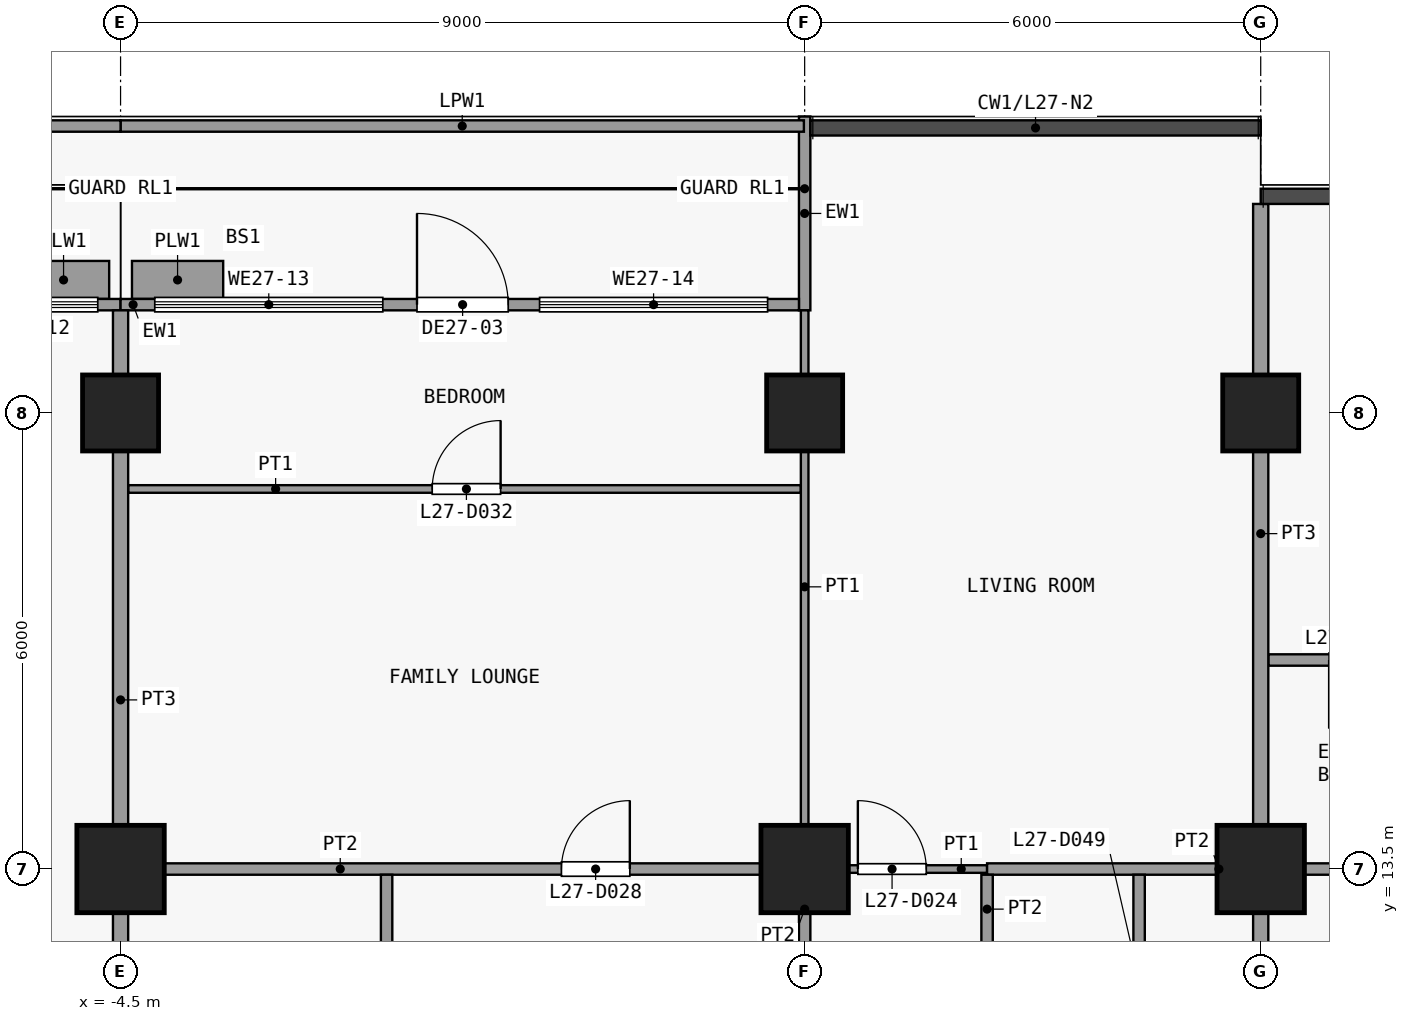
"""IFC4 building model, lengths in metres.
Left out: names, types, materials, properties, quantities, classifications, styles, units other than length and angle.
Written with IfcOpenShell. Run it as: python <this file> out.ifc"""

import sys

from ifc_helpers import new_model, si_unit, direction, frame, frame_2d, origin, origin_2d, place, context, subcontext, project, spatial, rectangle, extrude, element, fill, save


model = new_model("IFC4")
c1 = context("Model", 3, precision=1e-05, world=origin(), true_north=direction((0.0, 1.0)))
c2 = subcontext(c1, "Body", "Model", "MODEL_VIEW")
j1 = project(units=[si_unit("LENGTHUNIT", "METRE"), si_unit("PLANEANGLEUNIT", "RADIAN")], contexts=[c1])
p1 = place(None, origin())
s1 = spatial("IfcSite", under=j1, at=p1, CompositionType="ELEMENT")
p2 = place(p1, origin())
s2 = spatial("IfcBuilding", under=s1, at=p2, CompositionType="ELEMENT")
p3 = place(p2, frame((0.0, 0.0, 109.9)))
s3 = spatial("IfcBuildingStorey", under=s2, at=p3, CompositionType="ELEMENT", Elevation=109.9)
p4 = place(p3, frame((-4.5, 13.5, 0.0), z_axis=(0.0, 0.0, 1.0), x_axis=(1.0, 0.0, 0.0)))
e1 = element("IfcColumn", 1, at=p4, inside=s3, PredefinedType="COLUMN", context=c2, shape_type="SweptSolid", body=[
    extrude(rectangle(XDim=1.15, YDim=1.15, at=origin_2d()), origin(), (0.0, 0.0, 1.0), 3.6),
])
p5 = place(p3, frame((-4.5, 19.5, 0.0), z_axis=(0.0, 0.0, 1.0), x_axis=(1.0, 0.0, 0.0)))
e2 = element("IfcColumn", 2, at=p5, inside=s3, PredefinedType="COLUMN", context=c2, shape_type="SweptSolid", body=[
    extrude(rectangle(XDim=1.0, YDim=1.0, at=origin_2d()), origin(), (0.0, 0.0, 1.0), 3.6),
])
p6 = place(p3, frame((4.5, 13.5, 0.0), z_axis=(0.0, 0.0, 1.0), x_axis=(1.0, 0.0, 0.0)))
e3 = element("IfcColumn", 3, at=p6, inside=s3, PredefinedType="COLUMN", context=c2, shape_type="SweptSolid", body=[
    extrude(rectangle(XDim=1.15, YDim=1.15, at=origin_2d()), origin(), (0.0, 0.0, 1.0), 3.6),
])
p7 = place(p3, frame((4.5, 19.5, 0.0), z_axis=(0.0, 0.0, 1.0), x_axis=(1.0, 0.0, 0.0)))
e4 = element("IfcColumn", 4, at=p7, inside=s3, PredefinedType="COLUMN", context=c2, shape_type="SweptSolid", body=[
    extrude(rectangle(XDim=1.0, YDim=1.0, at=origin_2d()), origin(), (0.0, 0.0, 1.0), 3.6),
])
p8 = place(p3, frame((10.5, 13.5, 0.0), z_axis=(0.0, 0.0, 1.0), x_axis=(1.0, 0.0, 0.0)))
e5 = element("IfcColumn", 5, at=p8, inside=s3, PredefinedType="COLUMN", context=c2, shape_type="SweptSolid", body=[
    extrude(rectangle(XDim=1.15, YDim=1.15, at=origin_2d()), origin(), (0.0, 0.0, 1.0), 3.6),
])
p9 = place(p3, frame((10.5, 19.5, 0.0), z_axis=(0.0, 0.0, 1.0), x_axis=(1.0, 0.0, 0.0)))
e6 = element("IfcColumn", 6, at=p9, inside=s3, PredefinedType="COLUMN", context=c2, shape_type="SweptSolid", body=[
    extrude(rectangle(XDim=1.0, YDim=1.0, at=origin_2d()), origin(), (0.0, 0.0, 1.0), 3.6),
])
p10 = place(p3, frame((-10.5, 20.925, 0.0), z_axis=(0.0, 0.0, 1.0), x_axis=(1.0, 0.0, 0.0)))
e7 = element("IfcWall", 7, at=p10, inside=s3, PredefinedType="SOLIDWALL", context=c2, shape_type="SweptSolid", body=[
    extrude(rectangle(XDim=6.0, YDim=0.15, at=frame_2d((3.0, 0.0))), origin(), (0.0, 0.0, 1.0), 3.3),
])
p11 = place(p10, frame((2.4, 0.0, 0.0)))
e8 = element("IfcOpeningElement", 8, at=p11, cuts=e7, PredefinedType="OPENING", context=c2, shape_type="SweptSolid", body=[
    extrude(rectangle(XDim=1.2, YDim=2.4, at=frame_2d((0.6, 1.2))), frame((0.0, 0.085, 0.0), z_axis=(0.0, -1.0, 0.0), x_axis=(1.0, 0.0, 0.0)), (0.0, 0.0, 1.0), 0.17),
])
p12 = place(p10, frame((0.3, 0.0, 0.9)))
e9 = element("IfcOpeningElement", 9, at=p12, cuts=e7, PredefinedType="OPENING", context=c2, shape_type="SweptSolid", body=[
    extrude(rectangle(XDim=1.8, YDim=2.1, at=frame_2d((0.9, 1.05))), frame((0.0, 0.085, 0.0), z_axis=(0.0, -1.0, 0.0), x_axis=(1.0, 0.0, 0.0)), (0.0, 0.0, 1.0), 0.17),
])
p13 = place(p10, frame((3.9, 0.0, 0.9)))
e10 = element("IfcOpeningElement", 10, at=p13, cuts=e7, PredefinedType="OPENING", context=c2, shape_type="SweptSolid", body=[
    extrude(rectangle(XDim=1.8, YDim=2.1, at=frame_2d((0.9, 1.05))), frame((0.0, 0.085, 0.0), z_axis=(0.0, -1.0, 0.0), x_axis=(1.0, 0.0, 0.0)), (0.0, 0.0, 1.0), 0.17),
])
p14 = place(p3, frame((-5.85, 21.25, 0.0), z_axis=(0.0, 0.0, 1.0), x_axis=(1.0, 0.0, 0.0)))
e11 = element("IfcWall", 11, at=p14, inside=s3, PredefinedType="USERDEFINED", context=c2, shape_type="SweptSolid", body=[
    extrude(rectangle(XDim=1.2, YDim=0.5, at=frame_2d((0.6, 0.0))), origin(), (0.0, 0.0, 1.0), 0.9),
])
p15 = place(p3, frame((4.5, 20.85, 0.0), z_axis=(0.0, 0.0, 1.0), x_axis=(0.0, 1.0, 0.0)))
e12 = element("IfcWall", 12, at=p15, inside=s3, PredefinedType="SOLIDWALL", context=c2, shape_type="SweptSolid", body=[
    extrude(rectangle(XDim=2.55, YDim=0.15, at=frame_2d((1.275, 0.0))), origin(), (0.0, 0.0, 1.0), 3.3),
])
p16 = place(p3, frame((-4.5, 20.925, 0.0), z_axis=(0.0, 0.0, 1.0), x_axis=(1.0, 0.0, 0.0)))
e13 = element("IfcWall", 13, at=p16, inside=s3, PredefinedType="SOLIDWALL", context=c2, shape_type="SweptSolid", body=[
    extrude(rectangle(XDim=8.925, YDim=0.15, at=frame_2d((4.462, 0.0))), origin(), (0.0, 0.0, 1.0), 3.3),
])
p17 = place(p16, frame((3.9, 0.0, 0.0)))
e14 = element("IfcOpeningElement", 14, at=p17, cuts=e13, PredefinedType="OPENING", context=c2, shape_type="SweptSolid", body=[
    extrude(rectangle(XDim=1.2, YDim=2.4, at=frame_2d((0.6, 1.2))), frame((0.0, 0.085, 0.0), z_axis=(0.0, -1.0, 0.0), x_axis=(1.0, 0.0, 0.0)), (0.0, 0.0, 1.0), 0.17),
])
p18 = place(p16, frame((0.45, 0.0, 0.9)))
e15 = element("IfcOpeningElement", 15, at=p18, cuts=e13, PredefinedType="OPENING", context=c2, shape_type="SweptSolid", body=[
    extrude(rectangle(XDim=3.0, YDim=2.1, at=frame_2d((1.5, 1.05))), frame((0.0, 0.085, 0.0), z_axis=(0.0, -1.0, 0.0), x_axis=(1.0, 0.0, 0.0)), (0.0, 0.0, 1.0), 0.17),
])
p19 = place(p16, frame((5.512, 0.0, 0.9)))
e16 = element("IfcOpeningElement", 16, at=p19, cuts=e13, PredefinedType="OPENING", context=c2, shape_type="SweptSolid", body=[
    extrude(rectangle(XDim=3.0, YDim=2.1, at=frame_2d((1.5, 1.05))), frame((0.0, 0.085, 0.0), z_axis=(0.0, -1.0, 0.0), x_axis=(1.0, 0.0, 0.0)), (0.0, 0.0, 1.0), 0.17),
])
p20 = place(p3, frame((-4.35, 21.25, 0.0), z_axis=(0.0, 0.0, 1.0), x_axis=(1.0, 0.0, 0.0)))
e17 = element("IfcWall", 17, at=p20, inside=s3, PredefinedType="USERDEFINED", context=c2, shape_type="SweptSolid", body=[
    extrude(rectangle(XDim=1.2, YDim=0.5, at=frame_2d((0.6, 0.0))), origin(), (0.0, 0.0, 1.0), 0.9),
])
p21 = place(p3, frame((-4.5, 23.275, 0.0), z_axis=(0.0, 0.0, 1.0), x_axis=(1.0, 0.0, 0.0)))
e18 = element("IfcWall", 18, at=p21, inside=s3, PredefinedType="PARAPET", context=c2, shape_type="SweptSolid", body=[
    extrude(rectangle(XDim=8.99, YDim=0.15, at=frame_2d((4.495, 0.0))), origin(), (0.0, 0.0, 1.0), 1.15),
])
p22 = place(p3, frame((-10.3, 23.275, 0.0), z_axis=(0.0, 0.0, 1.0), x_axis=(1.0, 0.0, 0.0)))
e19 = element("IfcWall", 19, at=p22, inside=s3, PredefinedType="PARAPET", context=c2, shape_type="SweptSolid", body=[
    extrude(rectangle(XDim=5.8, YDim=0.15, at=frame_2d((2.9, 0.0))), origin(), (0.0, 0.0, 1.0), 1.15),
])
p23 = place(p3, frame((4.5, 13.5, 0.0), z_axis=(0.0, 0.0, 1.0), x_axis=(1.0, 0.0, 0.0)))
e20 = element("IfcWall", 20, at=p23, inside=s3, PredefinedType="PARTITIONING", context=c2, shape_type="SweptSolid", body=[
    extrude(rectangle(XDim=2.4, YDim=0.1, at=frame_2d((1.2, 0.0))), origin(), (0.0, 0.0, 1.0), 3.3),
])
p24 = place(p23, frame((0.7, 0.0, 0.0)))
e21 = element("IfcOpeningElement", 21, at=p24, cuts=e20, PredefinedType="OPENING", context=c2, shape_type="SweptSolid", body=[
    extrude(rectangle(XDim=0.9, YDim=2.1, at=frame_2d((0.45, 1.05))), frame((0.0, 0.06, 0.0), z_axis=(0.0, -1.0, 0.0), x_axis=(1.0, 0.0, 0.0)), (0.0, 0.0, 1.0), 0.12),
])
p25 = place(p3, frame((-4.4, 13.5, 0.0), z_axis=(0.0, 0.0, 1.0), x_axis=(1.0, 0.0, 0.0)))
e22 = element("IfcWall", 22, at=p25, inside=s3, PredefinedType="PARTITIONING", context=c2, shape_type="SweptSolid", body=[
    extrude(rectangle(XDim=8.9, YDim=0.15, at=frame_2d((4.45, 0.0))), origin(), (0.0, 0.0, 1.0), 3.3),
])
p26 = place(p25, frame((5.7, 0.0, 0.0)))
e23 = element("IfcOpeningElement", 23, at=p26, cuts=e22, PredefinedType="OPENING", context=c2, shape_type="SweptSolid", body=[
    extrude(rectangle(XDim=0.9, YDim=2.1, at=frame_2d((0.45, 1.05))), frame((0.0, 0.085, 0.0), z_axis=(0.0, -1.0, 0.0), x_axis=(1.0, 0.0, 0.0)), (0.0, 0.0, 1.0), 0.17),
])
p27 = place(p3, frame((6.9, 13.5, 0.0), z_axis=(0.0, 0.0, 1.0), x_axis=(1.0, 0.0, 0.0)))
e24 = element("IfcWall", 24, at=p27, inside=s3, PredefinedType="PARTITIONING", context=c2, shape_type="SweptSolid", body=[
    extrude(rectangle(XDim=6.1, YDim=0.15, at=frame_2d((3.05, 0.0))), origin(), (0.0, 0.0, 1.0), 3.3),
])
p28 = place(p3, frame((10.6, 16.25, 0.0), z_axis=(0.0, 0.0, 1.0), x_axis=(1.0, 0.0, 0.0)))
e25 = element("IfcWall", 25, at=p28, inside=s3, PredefinedType="PARTITIONING", context=c2, shape_type="SweptSolid", body=[
    extrude(rectangle(XDim=2.6, YDim=0.15, at=frame_2d((1.3, 0.0))), origin(), (0.0, 0.0, 1.0), 3.3),
])
p29 = place(p28, frame((0.8, 0.0, 0.0)))
e26 = element("IfcOpeningElement", 26, at=p29, cuts=e25, PredefinedType="OPENING", context=c2, shape_type="SweptSolid", body=[
    extrude(rectangle(XDim=0.9, YDim=2.1, at=frame_2d((0.45, 1.05))), frame((0.0, 0.085, 0.0), z_axis=(0.0, -1.0, 0.0), x_axis=(1.0, 0.0, 0.0)), (0.0, 0.0, 1.0), 0.17),
])
p30 = place(p3, frame((-4.4, 18.5, 0.0), z_axis=(0.0, 0.0, 1.0), x_axis=(1.0, 0.0, 0.0)))
e27 = element("IfcWall", 27, at=p30, inside=s3, PredefinedType="PARTITIONING", context=c2, shape_type="SweptSolid", body=[
    extrude(rectangle(XDim=8.85, YDim=0.1, at=frame_2d((4.425, 0.0))), origin(), (0.0, 0.0, 1.0), 3.3),
])
p31 = place(p30, frame((4.0, 0.0, 0.0)))
e28 = element("IfcOpeningElement", 28, at=p31, cuts=e27, PredefinedType="OPENING", context=c2, shape_type="SweptSolid", body=[
    extrude(rectangle(XDim=0.9, YDim=2.1, at=frame_2d((0.45, 1.05))), frame((0.0, 0.06, 0.0), z_axis=(0.0, -1.0, 0.0), x_axis=(1.0, 0.0, 0.0)), (0.0, 0.0, 1.0), 0.12),
])
p32 = place(p3, frame((-4.5, 10.6, 0.0), z_axis=(0.0, 0.0, 1.0), x_axis=(0.0, 1.0, 0.0)))
e29 = element("IfcWall", 29, at=p32, inside=s3, PredefinedType="PARTITIONING", context=c2, shape_type="SweptSolid", body=[
    extrude(rectangle(XDim=10.25, YDim=0.2, at=frame_2d((5.125, 0.0))), origin(), (0.0, 0.0, 1.0), 3.3),
])
p33 = place(p3, frame((-1.0, 10.6, 0.0), z_axis=(0.0, 0.0, 1.0), x_axis=(0.0, 1.0, 0.0)))
e30 = element("IfcWall", 30, at=p33, inside=s3, PredefinedType="PARTITIONING", context=c2, shape_type="SweptSolid", body=[
    extrude(rectangle(XDim=2.825, YDim=0.15, at=frame_2d((1.413, 0.0))), origin(), (0.0, 0.0, 1.0), 3.3),
])
p34 = place(p33, frame((1.0, 0.0, 0.0)))
e31 = element("IfcOpeningElement", 31, at=p34, cuts=e30, PredefinedType="OPENING", context=c2, shape_type="SweptSolid", body=[
    extrude(rectangle(XDim=0.9, YDim=2.1, at=frame_2d((0.45, 1.05))), frame((0.0, 0.085, 0.0), z_axis=(0.0, -1.0, 0.0), x_axis=(1.0, 0.0, 0.0)), (0.0, 0.0, 1.0), 0.17),
])
p35 = place(p3, frame((4.5, 13.575, 0.0), z_axis=(0.0, 0.0, 1.0), x_axis=(0.0, 1.0, 0.0)))
e32 = element("IfcWall", 32, at=p35, inside=s3, PredefinedType="PARTITIONING", context=c2, shape_type="SweptSolid", body=[
    extrude(rectangle(XDim=7.275, YDim=0.1, at=frame_2d((3.638, 0.0))), origin(), (0.0, 0.0, 1.0), 3.3),
])
p36 = place(p3, frame((4.5, 10.6, 0.0), z_axis=(0.0, 0.0, 1.0), x_axis=(0.0, 1.0, 0.0)))
e33 = element("IfcWall", 33, at=p36, inside=s3, PredefinedType="PARTITIONING", context=c2, shape_type="SweptSolid", body=[
    extrude(rectangle(XDim=2.825, YDim=0.15, at=frame_2d((1.413, 0.0))), origin(), (0.0, 0.0, 1.0), 3.3),
])
p37 = place(p36, frame((0.9, 0.0, 0.0)))
e34 = element("IfcOpeningElement", 34, at=p37, cuts=e33, PredefinedType="OPENING", context=c2, shape_type="SweptSolid", body=[
    extrude(rectangle(XDim=0.9, YDim=2.1, at=frame_2d((0.45, 1.05))), frame((0.0, 0.085, 0.0), z_axis=(0.0, -1.0, 0.0), x_axis=(1.0, 0.0, 0.0)), (0.0, 0.0, 1.0), 0.17),
])
p38 = place(p3, frame((6.9, 10.6, 0.0), z_axis=(0.0, 0.0, 1.0), x_axis=(0.0, 1.0, 0.0)))
e35 = element("IfcWall", 35, at=p38, inside=s3, PredefinedType="PARTITIONING", context=c2, shape_type="SweptSolid", body=[
    extrude(rectangle(XDim=2.825, YDim=0.15, at=frame_2d((1.413, 0.0))), origin(), (0.0, 0.0, 1.0), 3.3),
])
p39 = place(p38, frame((0.9, 0.0, 0.0)))
e36 = element("IfcOpeningElement", 36, at=p39, cuts=e35, PredefinedType="OPENING", context=c2, shape_type="SweptSolid", body=[
    extrude(rectangle(XDim=0.9, YDim=2.1, at=frame_2d((0.45, 1.05))), frame((0.0, 0.085, 0.0), z_axis=(0.0, -1.0, 0.0), x_axis=(1.0, 0.0, 0.0)), (0.0, 0.0, 1.0), 0.17),
])
p40 = place(p3, frame((8.9, 10.6, 0.0), z_axis=(0.0, 0.0, 1.0), x_axis=(0.0, 1.0, 0.0)))
e37 = element("IfcWall", 37, at=p40, inside=s3, PredefinedType="PARTITIONING", context=c2, shape_type="SweptSolid", body=[
    extrude(rectangle(XDim=2.825, YDim=0.15, at=frame_2d((1.413, 0.0))), origin(), (0.0, 0.0, 1.0), 3.3),
])
p41 = place(p40, frame((1.0, 0.0, 0.0)))
e38 = element("IfcOpeningElement", 38, at=p41, cuts=e37, PredefinedType="OPENING", context=c2, shape_type="SweptSolid", body=[
    extrude(rectangle(XDim=0.9, YDim=2.1, at=frame_2d((0.45, 1.05))), frame((0.0, 0.085, 0.0), z_axis=(0.0, -1.0, 0.0), x_axis=(1.0, 0.0, 0.0)), (0.0, 0.0, 1.0), 0.17),
])
p42 = place(p3, frame((10.5, 10.6, 0.0), z_axis=(0.0, 0.0, 1.0), x_axis=(0.0, 1.0, 0.0)))
e39 = element("IfcWall", 39, at=p42, inside=s3, PredefinedType="PARTITIONING", context=c2, shape_type="SweptSolid", body=[
    extrude(rectangle(XDim=2.825, YDim=0.2, at=frame_2d((1.413, 0.0))), origin(), (0.0, 0.0, 1.0), 3.3),
])
p43 = place(p3, frame((10.5, 13.575, 0.0), z_axis=(0.0, 0.0, 1.0), x_axis=(0.0, 1.0, 0.0)))
e40 = element("IfcWall", 40, at=p43, inside=s3, PredefinedType="PARTITIONING", context=c2, shape_type="SweptSolid", body=[
    extrude(rectangle(XDim=8.675, YDim=0.2, at=frame_2d((4.337, 0.0))), origin(), (0.0, 0.0, 1.0), 3.3),
])
p44 = place(p13, origin())
e41 = element("IfcWindow", 41, at=p44, inside=s3, PartitioningType="SINGLE_PANEL", PredefinedType="WINDOW", context=c2, shape_type="SweptSolid", body=[
    extrude(rectangle(XDim=1.8, YDim=2.1, at=frame_2d((0.9, 1.05))), frame((0.0, 0.03, 0.0), z_axis=(0.0, -1.0, 0.0), x_axis=(1.0, 0.0, 0.0)), (0.0, 0.0, 1.0), 0.06),
])
fill(e10, e41)
p45 = place(p17, origin())
e42 = element("IfcDoor", 42, at=p45, inside=s3, OperationType="SINGLE_SWING_LEFT", PredefinedType="DOOR", context=c2, shape_type="SweptSolid", body=[
    extrude(rectangle(XDim=1.2, YDim=2.4, at=frame_2d((0.6, 1.2))), frame((0.0, 0.025, 0.0), z_axis=(0.0, -1.0, 0.0), x_axis=(1.0, 0.0, 0.0)), (0.0, 0.0, 1.0), 0.05),
])
fill(e14, e42)
p46 = place(p18, origin())
e43 = element("IfcWindow", 43, at=p46, inside=s3, PartitioningType="SINGLE_PANEL", PredefinedType="WINDOW", context=c2, shape_type="SweptSolid", body=[
    extrude(rectangle(XDim=3.0, YDim=2.1, at=frame_2d((1.5, 1.05))), frame((0.0, 0.03, 0.0), z_axis=(0.0, -1.0, 0.0), x_axis=(1.0, 0.0, 0.0)), (0.0, 0.0, 1.0), 0.06),
])
fill(e15, e43)
p47 = place(p19, origin())
e44 = element("IfcWindow", 44, at=p47, inside=s3, PartitioningType="SINGLE_PANEL", PredefinedType="WINDOW", context=c2, shape_type="SweptSolid", body=[
    extrude(rectangle(XDim=3.0, YDim=2.1, at=frame_2d((1.5, 1.05))), frame((0.0, 0.03, 0.0), z_axis=(0.0, -1.0, 0.0), x_axis=(1.0, 0.0, 0.0)), (0.0, 0.0, 1.0), 0.06),
])
fill(e16, e44)
p48 = place(p24, origin())
e45 = element("IfcDoor", 45, at=p48, inside=s3, OperationType="SINGLE_SWING_RIGHT", PredefinedType="DOOR", context=c2, shape_type="SweptSolid", body=[
    extrude(rectangle(XDim=0.9, YDim=2.1, at=frame_2d((0.45, 1.05))), frame((0.0, 0.025, 0.0), z_axis=(0.0, -1.0, 0.0), x_axis=(1.0, 0.0, 0.0)), (0.0, 0.0, 1.0), 0.05),
])
fill(e21, e45)
p49 = place(p26, origin())
e46 = element("IfcDoor", 46, at=p49, inside=s3, OperationType="SINGLE_SWING_LEFT", PredefinedType="DOOR", context=c2, shape_type="SweptSolid", body=[
    extrude(rectangle(XDim=0.9, YDim=2.1, at=frame_2d((0.45, 1.05))), frame((0.0, 0.025, 0.0), z_axis=(0.0, -1.0, 0.0), x_axis=(1.0, 0.0, 0.0)), (0.0, 0.0, 1.0), 0.05),
])
fill(e23, e46)
p50 = place(p31, origin())
e47 = element("IfcDoor", 47, at=p50, inside=s3, OperationType="SINGLE_SWING_LEFT", PredefinedType="DOOR", context=c2, shape_type="SweptSolid", body=[
    extrude(rectangle(XDim=0.9, YDim=2.1, at=frame_2d((0.45, 1.05))), frame((0.0, 0.025, 0.0), z_axis=(0.0, -1.0, 0.0), x_axis=(1.0, 0.0, 0.0)), (0.0, 0.0, 1.0), 0.05),
])
fill(e28, e47)
save(model, sys.argv[1])
